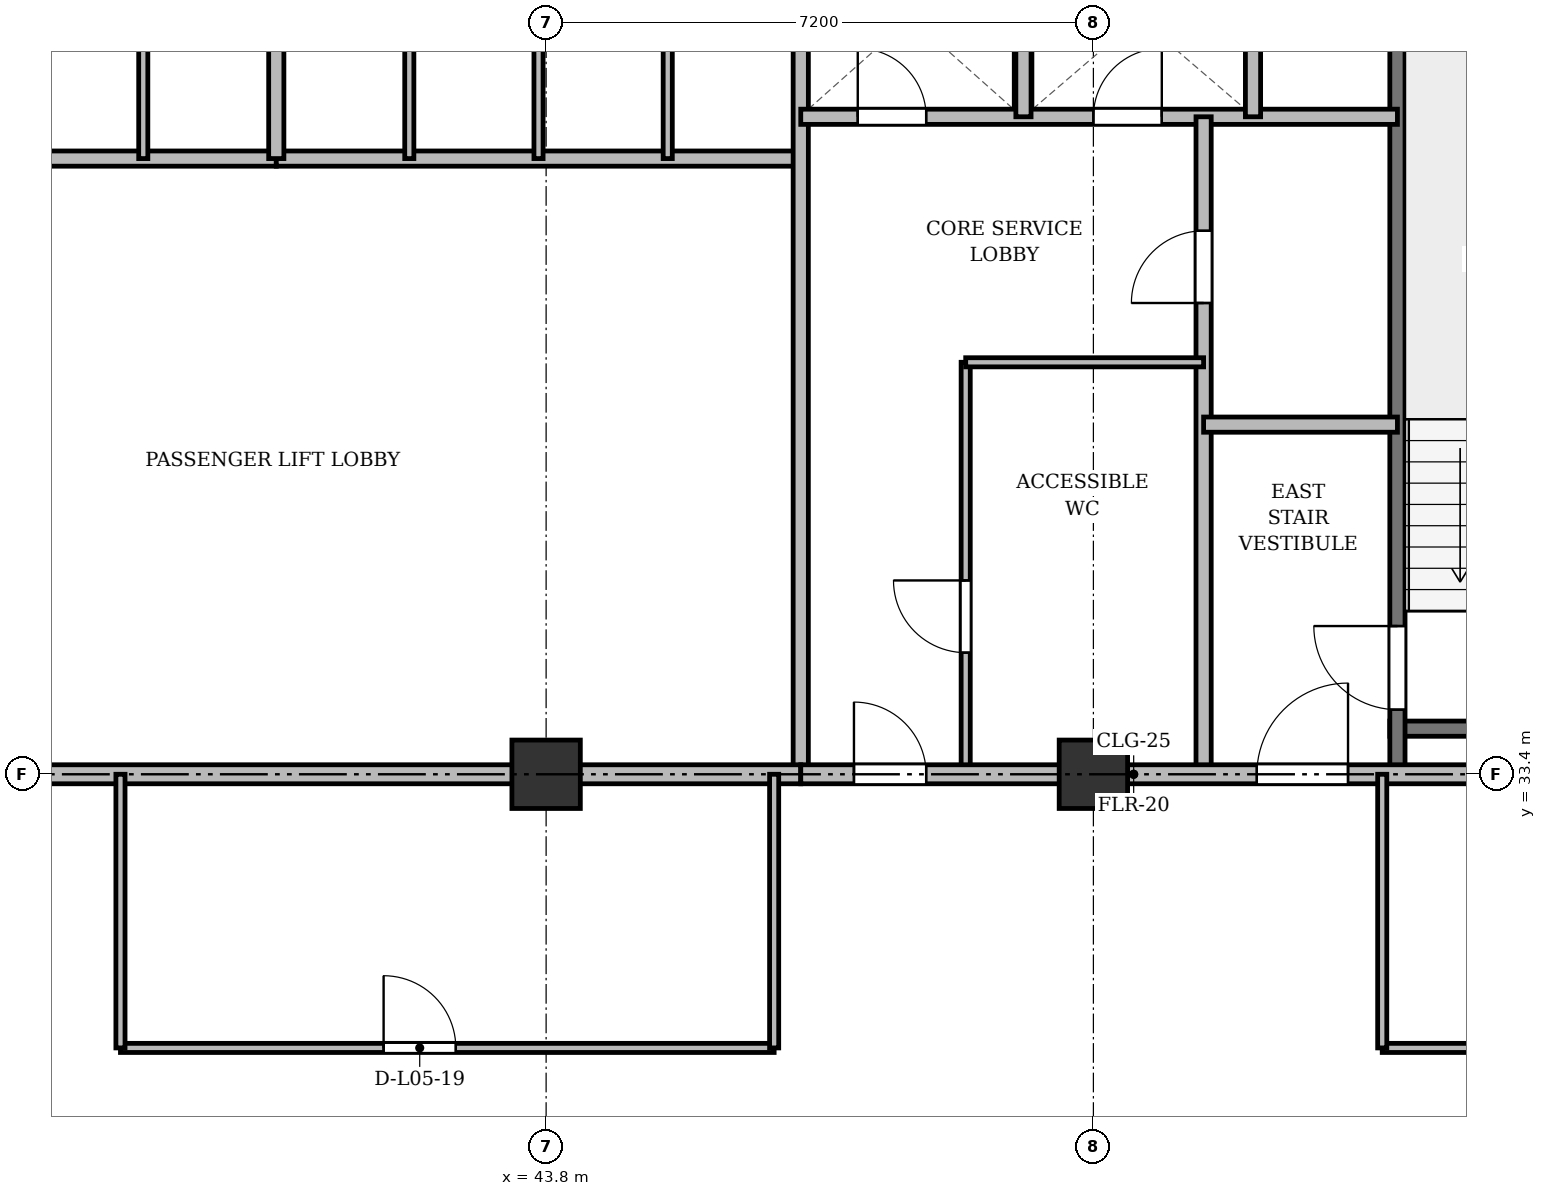
"""IFC4 building model, lengths in metres.
Left out: names, types, materials, properties, quantities, classifications, styles, units other than length and angle.
Written with IfcOpenShell. Run it as: python <this file> out.ifc"""

import sys

from ifc_helpers import new_model, si_unit, direction, frame, frame_2d, origin, origin_2d, place, context, subcontext, project, spatial, rectangle, extrude, source, transform, mapped, element, fill, save


model = new_model("IFC4")
c1 = context("Model", 3, precision=1e-05, world=origin(), true_north=direction((0.0, 1.0)))
c2 = subcontext(c1, "Body", "Model", "MODEL_VIEW")
j1 = project(units=[si_unit("LENGTHUNIT", "METRE"), si_unit("PLANEANGLEUNIT", "RADIAN")], contexts=[c1])
p1 = place(None, origin())
s1 = spatial("IfcSite", under=j1, at=p1, CompositionType="ELEMENT")
p2 = place(p1, origin())
s2 = spatial("IfcBuilding", under=s1, at=p2, CompositionType="ELEMENT")
p3 = place(p2, frame((0.0, 0.0, 23.5)))
s3 = spatial("IfcBuildingStorey", under=s2, at=p3, CompositionType="ELEMENT", Elevation=23.5)
m1 = source(origin(), c2, "Body", "SweptSolid", [
    extrude(rectangle(XDim=0.9, YDim=0.9, at=origin_2d()), origin(), (0.0, 0.0, 1.0), 3.6),
])
for number, where, z_axis, x_axis in (
    (1, (43.8, 33.4, 0.0), (0.0, 0.0, 1.0), (1.0, 0.0, 0.0)),
    (2, (51.0, 33.4, 0.0), (0.0, 0.0, 1.0), (1.0, 0.0, 0.0)),
):
    element("IfcColumn", number, at=place(p3, frame(where, z_axis=z_axis, x_axis=x_axis)), inside=s3, PredefinedType="COLUMN", context=c2, shape_type="MappedRepresentation", body=[
        mapped(m1, transform((0.0, 0.0, 0.0), x_axis=(1.0, 0.0, 0.0), y_axis=(0.0, 1.0, 0.0), z_axis=(0.0, 0.0, 1.0), scale=1.0)),
    ])
p4 = place(p3, frame((54.9, 34.0, 0.0), z_axis=(0.0, 0.0, 1.0), x_axis=(1.0, 0.0, 0.0)))
e3 = element("IfcWall", 3, at=p4, inside=s3, PredefinedType="SHEAR", context=c2, shape_type="SweptSolid", body=[
    extrude(rectangle(XDim=3.4, YDim=0.2, at=frame_2d((1.7, 0.0))), origin(), (0.0, 0.0, 1.0), 3.34),
])
p5 = place(p3, frame((55.0, 33.4, 0.0), z_axis=(0.0, 0.0, 1.0), x_axis=(0.0, 1.0, 0.0)))
e4 = element("IfcWall", 4, at=p5, inside=s3, PredefinedType="SHEAR", context=c2, shape_type="SweptSolid", body=[
    extrude(rectangle(XDim=11.1, YDim=0.2, at=frame_2d((5.55, 0.0))), origin(), (0.0, 0.0, 1.0), 3.34),
])
p6 = place(p5, frame((0.85, 0.0, 0.0)))
e5 = element("IfcOpeningElement", 5, at=p6, cuts=e4, PredefinedType="OPENING", context=c2, shape_type="SweptSolid", body=[
    extrude(rectangle(XDim=1.1, YDim=2.15, at=frame_2d((0.55, 1.075))), frame((0.0, 0.11, 0.0), z_axis=(0.0, -1.0, 0.0), x_axis=(1.0, 0.0, 0.0)), (0.0, 0.0, 1.0), 0.22),
])
p7 = place(p3, frame((33.35, 41.5, 0.0), z_axis=(0.0, 0.0, 1.0), x_axis=(1.0, 0.0, 0.0)))
e6 = element("IfcWall", 6, at=p7, inside=s3, PredefinedType="SOLIDWALL", context=c2, shape_type="SweptSolid", body=[
    extrude(rectangle(XDim=6.9, YDim=0.2, at=frame_2d((3.45, 0.0))), origin(), (0.0, 0.0, 1.0), 3.34),
])
p8 = place(p3, frame((38.5, 41.5, 0.0), z_axis=(0.0, 0.0, 1.0), x_axis=(0.0, 1.0, 0.0)))
e7 = element("IfcWall", 7, at=p8, inside=s3, PredefinedType="PARTITIONING", context=c2, shape_type="SweptSolid", body=[
    extrude(rectangle(XDim=3.2, YDim=0.12, at=frame_2d((1.6, 0.0))), origin(), (0.0, 0.0, 1.0), 3.34),
])
p9 = place(p3, frame((40.25, 41.5, 0.0), z_axis=(0.0, 0.0, 1.0), x_axis=(1.0, 0.0, 0.0)))
e8 = element("IfcWall", 8, at=p9, inside=s3, PredefinedType="SOLIDWALL", context=c2, shape_type="SweptSolid", body=[
    extrude(rectangle(XDim=6.9, YDim=0.2, at=frame_2d((3.45, 0.0))), origin(), (0.0, 0.0, 1.0), 2.752),
])
p10 = place(p3, frame((40.25, 41.5, 0.0), z_axis=(0.0, 0.0, 1.0), x_axis=(0.0, 1.0, 0.0)))
e9 = element("IfcWall", 9, at=p10, inside=s3, PredefinedType="SOLIDWALL", context=c2, shape_type="SweptSolid", body=[
    extrude(rectangle(XDim=3.2, YDim=0.2, at=frame_2d((1.6, 0.0))), origin(), (0.0, 0.0, 1.0), 3.34),
])
p11 = place(p3, frame((42.0, 41.5, 0.0), z_axis=(0.0, 0.0, 1.0), x_axis=(0.0, 1.0, 0.0)))
e10 = element("IfcWall", 10, at=p11, inside=s3, PredefinedType="PARTITIONING", context=c2, shape_type="SweptSolid", body=[
    extrude(rectangle(XDim=3.2, YDim=0.12, at=frame_2d((1.6, 0.0))), origin(), (0.0, 0.0, 1.0), 3.34),
])
p12 = place(p3, frame((43.7, 41.5, 0.0), z_axis=(0.0, 0.0, 1.0), x_axis=(0.0, 1.0, 0.0)))
e11 = element("IfcWall", 11, at=p12, inside=s3, PredefinedType="PARTITIONING", context=c2, shape_type="SweptSolid", body=[
    extrude(rectangle(XDim=3.2, YDim=0.12, at=frame_2d((1.6, 0.0))), origin(), (0.0, 0.0, 1.0), 2.752),
])
p13 = place(p3, frame((45.4, 41.5, 0.0), z_axis=(0.0, 0.0, 1.0), x_axis=(0.0, 1.0, 0.0)))
e12 = element("IfcWall", 12, at=p13, inside=s3, PredefinedType="PARTITIONING", context=c2, shape_type="SweptSolid", body=[
    extrude(rectangle(XDim=3.2, YDim=0.12, at=frame_2d((1.6, 0.0))), origin(), (0.0, 0.0, 1.0), 3.34),
])
p14 = place(p3, frame((47.15, 33.4, 0.0), z_axis=(0.0, 0.0, 1.0), x_axis=(0.0, 1.0, 0.0)))
e13 = element("IfcWall", 13, at=p14, inside=s3, PredefinedType="SOLIDWALL", context=c2, shape_type="SweptSolid", body=[
    extrude(rectangle(XDim=11.3, YDim=0.2, at=frame_2d((5.65, 0.0))), origin(), (0.0, 0.0, 1.0), 2.69),
])
p15 = place(p3, frame((26.3, 33.4, 0.0), z_axis=(0.0, 0.0, 1.0), x_axis=(1.0, 0.0, 0.0)))
e14 = element("IfcWall", 14, at=p15, inside=s3, PredefinedType="PARTITIONING", context=c2, shape_type="SweptSolid", body=[
    extrude(rectangle(XDim=20.85, YDim=0.25, at=frame_2d((10.425, 0.0))), origin(), (0.0, 0.0, 1.0), 2.69),
])
p16 = place(p15, frame((9.2, 0.0, 0.0)))
e15 = element("IfcOpeningElement", 15, at=p16, cuts=e14, PredefinedType="OPENING", context=c2, shape_type="SweptSolid", body=[
    extrude(rectangle(XDim=1.6, YDim=2.2, at=frame_2d((0.8, 1.1))), frame((0.0, 0.135, 0.0), z_axis=(0.0, -1.0, 0.0), x_axis=(1.0, 0.0, 0.0)), (0.0, 0.0, 1.0), 0.27),
])
p17 = place(p3, frame((47.15, 42.05, 0.0), z_axis=(0.0, 0.0, 1.0), x_axis=(1.0, 0.0, 0.0)))
e16 = element("IfcWall", 16, at=p17, inside=s3, PredefinedType="SOLIDWALL", context=c2, shape_type="SweptSolid", body=[
    extrude(rectangle(XDim=7.85, YDim=0.2, at=frame_2d((3.925, 0.0))), origin(), (0.0, 0.0, 1.0), 2.752),
])
p18 = place(p17, frame((0.75, 0.0, 0.0)))
e17 = element("IfcOpeningElement", 17, at=p18, cuts=e16, PredefinedType="OPENING", context=c2, shape_type="SweptSolid", body=[
    extrude(rectangle(XDim=0.9, YDim=2.1, at=frame_2d((0.45, 1.05))), frame((0.0, 0.11, 0.0), z_axis=(0.0, -1.0, 0.0), x_axis=(1.0, 0.0, 0.0)), (0.0, 0.0, 1.0), 0.22),
])
p19 = place(p17, frame((3.85, 0.0, 0.0)))
e18 = element("IfcOpeningElement", 18, at=p19, cuts=e16, PredefinedType="OPENING", context=c2, shape_type="SweptSolid", body=[
    extrude(rectangle(XDim=0.9, YDim=2.1, at=frame_2d((0.45, 1.05))), frame((0.0, 0.11, 0.0), z_axis=(0.0, -1.0, 0.0), x_axis=(1.0, 0.0, 0.0)), (0.0, 0.0, 1.0), 0.22),
])
for number, where, z_axis, x_axis in (
    (19, (50.08, 42.05, 0.0), (0.0, 0.0, 1.0), (0.0, 1.0, 0.0)),
    (20, (53.1, 42.05, 0.0), (0.0, 0.0, 1.0), (0.0, 1.0, 0.0)),
):
    element("IfcWall", number, at=place(p3, frame(where, z_axis=z_axis, x_axis=x_axis)), inside=s3, PredefinedType="SOLIDWALL", context=c2, shape_type="SweptSolid", body=[
        extrude(rectangle(XDim=2.65, YDim=0.2, at=frame_2d((1.325, 0.0))), origin(), (0.0, 0.0, 1.0), 3.34),
    ])
p20 = place(p3, frame((52.45, 33.4, 0.0), z_axis=(0.0, 0.0, 1.0), x_axis=(0.0, 1.0, 0.0)))
e21 = element("IfcWall", 21, at=p20, inside=s3, PredefinedType="PARTITIONING", context=c2, shape_type="SweptSolid", body=[
    extrude(rectangle(XDim=8.65, YDim=0.2, at=frame_2d((4.325, 0.0))), origin(), (0.0, 0.0, 1.0), 2.69),
])
p21 = place(p20, frame((6.2, 0.0, 0.0)))
e22 = element("IfcOpeningElement", 22, at=p21, cuts=e21, PredefinedType="OPENING", context=c2, shape_type="SweptSolid", body=[
    extrude(rectangle(XDim=0.95, YDim=2.15, at=frame_2d((0.475, 1.075))), frame((0.0, 0.11, 0.0), z_axis=(0.0, -1.0, 0.0), x_axis=(1.0, 0.0, 0.0)), (0.0, 0.0, 1.0), 0.22),
])
p22 = place(p3, frame((52.45, 38.0, 0.0), z_axis=(0.0, 0.0, 1.0), x_axis=(1.0, 0.0, 0.0)))
e23 = element("IfcWall", 23, at=p22, inside=s3, PredefinedType="PARTITIONING", context=c2, shape_type="SweptSolid", body=[
    extrude(rectangle(XDim=2.55, YDim=0.2, at=frame_2d((1.275, 0.0))), origin(), (0.0, 0.0, 1.0), 3.34),
])
p23 = place(p3, frame((49.32, 33.4, 0.0), z_axis=(0.0, 0.0, 1.0), x_axis=(0.0, 1.0, 0.0)))
e24 = element("IfcWall", 24, at=p23, inside=s3, PredefinedType="PARTITIONING", context=c2, shape_type="SweptSolid", body=[
    extrude(rectangle(XDim=5.42, YDim=0.12, at=frame_2d((2.71, 0.0))), origin(), (0.0, 0.0, 1.0), 2.69),
])
p24 = place(p23, frame((1.6, 0.0, 0.0)))
e25 = element("IfcOpeningElement", 25, at=p24, cuts=e24, PredefinedType="OPENING", context=c2, shape_type="SweptSolid", body=[
    extrude(rectangle(XDim=0.95, YDim=2.15, at=frame_2d((0.475, 1.075))), frame((0.0, 0.07, 0.0), z_axis=(0.0, -1.0, 0.0), x_axis=(1.0, 0.0, 0.0)), (0.0, 0.0, 1.0), 0.14),
])
p25 = place(p3, frame((49.32, 38.82, 0.0), z_axis=(0.0, 0.0, 1.0), x_axis=(1.0, 0.0, 0.0)))
e26 = element("IfcWall", 26, at=p25, inside=s3, PredefinedType="PARTITIONING", context=c2, shape_type="SweptSolid", body=[
    extrude(rectangle(XDim=3.13, YDim=0.12, at=frame_2d((1.565, 0.0))), origin(), (0.0, 0.0, 1.0), 2.752),
])
p26 = place(p3, frame((47.15, 33.4, 0.0), z_axis=(0.0, 0.0, 1.0), x_axis=(1.0, 0.0, 0.0)))
e27 = element("IfcWall", 27, at=p26, inside=s3, PredefinedType="PARTITIONING", context=c2, shape_type="SweptSolid", body=[
    extrude(rectangle(XDim=11.15, YDim=0.25, at=frame_2d((5.575, 0.0))), origin(), (0.0, 0.0, 1.0), 2.69),
])
p27 = place(p26, frame((0.7, 0.0, 0.0)))
e28 = element("IfcOpeningElement", 28, at=p27, cuts=e27, PredefinedType="OPENING", context=c2, shape_type="SweptSolid", body=[
    extrude(rectangle(XDim=0.95, YDim=2.15, at=frame_2d((0.475, 1.075))), frame((0.0, 0.135, 0.0), z_axis=(0.0, -1.0, 0.0), x_axis=(1.0, 0.0, 0.0)), (0.0, 0.0, 1.0), 0.27),
])
p28 = place(p26, frame((6.0, 0.0, 0.0)))
e29 = element("IfcOpeningElement", 29, at=p28, cuts=e27, PredefinedType="OPENING", context=c2, shape_type="SweptSolid", body=[
    extrude(rectangle(XDim=1.2, YDim=2.15, at=frame_2d((0.6, 1.075))), frame((0.0, 0.135, 0.0), z_axis=(0.0, -1.0, 0.0), x_axis=(1.0, 0.0, 0.0)), (0.0, 0.0, 1.0), 0.27),
])
p29 = place(p3, frame((38.2, 29.8, 0.0), z_axis=(0.0, 0.0, 1.0), x_axis=(1.0, 0.0, 0.0)))
e30 = element("IfcWall", 30, at=p29, inside=s3, PredefinedType="PARTITIONING", context=c2, shape_type="SweptSolid", body=[
    extrude(rectangle(XDim=8.6, YDim=0.12, at=frame_2d((4.3, 0.0))), origin(), (0.0, 0.0, 1.0), 2.752),
])
p30 = place(p29, frame((3.462, 0.0, 0.0)))
e31 = element("IfcOpeningElement", 31, at=p30, cuts=e30, PredefinedType="OPENING", context=c2, shape_type="SweptSolid", body=[
    extrude(rectangle(XDim=0.95, YDim=2.15, at=frame_2d((0.475, 1.075))), frame((0.0, 0.07, 0.0), z_axis=(0.0, -1.0, 0.0), x_axis=(1.0, 0.0, 0.0)), (0.0, 0.0, 1.0), 0.14),
])
p31 = place(p3, frame((54.8, 29.8, 0.0), z_axis=(0.0, 0.0, 1.0), x_axis=(1.0, 0.0, 0.0)))
e32 = element("IfcWall", 32, at=p31, inside=s3, PredefinedType="PARTITIONING", context=c2, shape_type="SweptSolid", body=[
    extrude(rectangle(XDim=14.85, YDim=0.12, at=frame_2d((7.425, 0.0))), origin(), (0.0, 0.0, 1.0), 2.752),
])
p32 = place(p31, frame((2.5, 0.0, 0.0)))
e33 = element("IfcOpeningElement", 33, at=p32, cuts=e32, PredefinedType="OPENING", context=c2, shape_type="SweptSolid", body=[
    extrude(rectangle(XDim=0.95, YDim=2.15, at=frame_2d((0.475, 1.075))), frame((0.0, 0.07, 0.0), z_axis=(0.0, -1.0, 0.0), x_axis=(1.0, 0.0, 0.0)), (0.0, 0.0, 1.0), 0.14),
])
p33 = place(p31, frame((9.2, 0.0, 0.0)))
e34 = element("IfcOpeningElement", 34, at=p33, cuts=e32, PredefinedType="OPENING", context=c2, shape_type="SweptSolid", body=[
    extrude(rectangle(XDim=0.95, YDim=2.15, at=frame_2d((0.475, 1.075))), frame((0.0, 0.07, 0.0), z_axis=(0.0, -1.0, 0.0), x_axis=(1.0, 0.0, 0.0)), (0.0, 0.0, 1.0), 0.14),
])
for number, where, z_axis, x_axis in (
    (35, (38.2, 29.8, 0.0), (0.0, 0.0, 1.0), (0.0, 1.0, 0.0)),
    (36, (46.8, 29.8, 0.0), (0.0, 0.0, 1.0), (0.0, 1.0, 0.0)),
    (37, (54.8, 29.8, 0.0), (0.0, 0.0, 1.0), (0.0, 1.0, 0.0)),
):
    element("IfcWall", number, at=place(p3, frame(where, z_axis=z_axis, x_axis=x_axis)), inside=s3, PredefinedType="PARTITIONING", context=c2, shape_type="SweptSolid", body=[
        extrude(rectangle(XDim=3.6, YDim=0.12, at=frame_2d((1.8, 0.0))), origin(), (0.0, 0.0, 1.0), 2.69),
    ])
m2 = source(origin(), c2, "Body", "SweptSolid", [
    extrude(rectangle(XDim=1.1, YDim=2.15, at=frame_2d((0.55, 1.075))), frame((0.0, 0.025, 0.0), z_axis=(0.0, -1.0, 0.0), x_axis=(1.0, 0.0, 0.0)), (0.0, 0.0, 1.0), 0.05),
])
p34 = place(p6, origin())
e38 = element("IfcDoor", 38, at=p34, inside=s3, OperationType="SINGLE_SWING_RIGHT", PredefinedType="DOOR", context=c2, shape_type="MappedRepresentation", body=[
    mapped(m2, transform((0.0, 0.0, 0.0), x_axis=(1.0, 0.0, 0.0), y_axis=(0.0, 1.0, 0.0), z_axis=(0.0, 0.0, 1.0), scale=1.0)),
])
fill(e5, e38)
m3 = source(origin(), c2, "Body", "SweptSolid", [
    extrude(rectangle(XDim=0.9, YDim=2.1, at=frame_2d((0.45, 1.05))), frame((0.0, 0.025, 0.0), z_axis=(0.0, -1.0, 0.0), x_axis=(1.0, 0.0, 0.0)), (0.0, 0.0, 1.0), 0.05),
])
p35 = place(p18, origin())
e39 = element("IfcDoor", 39, at=p35, inside=s3, OperationType="SINGLE_SWING_LEFT", PredefinedType="DOOR", context=c2, shape_type="MappedRepresentation", body=[
    mapped(m3, transform((0.0, 0.0, 0.0), x_axis=(1.0, 0.0, 0.0), y_axis=(0.0, 1.0, 0.0), z_axis=(0.0, 0.0, 1.0), scale=1.0)),
])
fill(e17, e39)
p36 = place(p19, origin())
e40 = element("IfcDoor", 40, at=p36, inside=s3, OperationType="SINGLE_SWING_RIGHT", PredefinedType="DOOR", context=c2, shape_type="MappedRepresentation", body=[
    mapped(m3, transform((0.0, 0.0, 0.0), x_axis=(1.0, 0.0, 0.0), y_axis=(0.0, 1.0, 0.0), z_axis=(0.0, 0.0, 1.0), scale=1.0)),
])
fill(e18, e40)
m4 = source(origin(), c2, "Body", "SweptSolid", [
    extrude(rectangle(XDim=0.95, YDim=2.15, at=frame_2d((0.475, 1.075))), frame((0.0, 0.025, 0.0), z_axis=(0.0, -1.0, 0.0), x_axis=(1.0, 0.0, 0.0)), (0.0, 0.0, 1.0), 0.05),
])
p37 = place(p21, origin())
e41 = element("IfcDoor", 41, at=p37, inside=s3, OperationType="SINGLE_SWING_LEFT", PredefinedType="DOOR", context=c2, shape_type="MappedRepresentation", body=[
    mapped(m4, transform((0.0, 0.0, 0.0), x_axis=(1.0, 0.0, 0.0), y_axis=(0.0, 1.0, 0.0), z_axis=(0.0, 0.0, 1.0), scale=1.0)),
])
fill(e22, e41)
p38 = place(p24, origin())
e42 = element("IfcDoor", 42, at=p38, inside=s3, OperationType="SINGLE_SWING_RIGHT", PredefinedType="DOOR", context=c2, shape_type="MappedRepresentation", body=[
    mapped(m4, transform((0.0, 0.0, 0.0), x_axis=(1.0, 0.0, 0.0), y_axis=(0.0, 1.0, 0.0), z_axis=(0.0, 0.0, 1.0), scale=1.0)),
])
fill(e25, e42)
p39 = place(p27, origin())
e43 = element("IfcDoor", 43, at=p39, inside=s3, OperationType="SINGLE_SWING_LEFT", PredefinedType="DOOR", context=c2, shape_type="MappedRepresentation", body=[
    mapped(m4, transform((0.0, 0.0, 0.0), x_axis=(1.0, 0.0, 0.0), y_axis=(0.0, 1.0, 0.0), z_axis=(0.0, 0.0, 1.0), scale=1.0)),
])
fill(e28, e43)
m5 = source(origin(), c2, "Body", "SweptSolid", [
    extrude(rectangle(XDim=1.2, YDim=2.15, at=frame_2d((0.6, 1.075))), frame((0.0, 0.025, 0.0), z_axis=(0.0, -1.0, 0.0), x_axis=(1.0, 0.0, 0.0)), (0.0, 0.0, 1.0), 0.05),
])
p40 = place(p28, origin())
e44 = element("IfcDoor", 44, at=p40, inside=s3, OperationType="SINGLE_SWING_RIGHT", PredefinedType="DOOR", context=c2, shape_type="MappedRepresentation", body=[
    mapped(m5, transform((0.0, 0.0, 0.0), x_axis=(1.0, 0.0, 0.0), y_axis=(0.0, 1.0, 0.0), z_axis=(0.0, 0.0, 1.0), scale=1.0)),
])
fill(e29, e44)
p41 = place(p30, origin())
e45 = element("IfcDoor", 45, at=p41, inside=s3, OperationType="SINGLE_SWING_LEFT", PredefinedType="DOOR", context=c2, shape_type="MappedRepresentation", body=[
    mapped(m4, transform((0.0, 0.0, 0.0), x_axis=(1.0, 0.0, 0.0), y_axis=(0.0, 1.0, 0.0), z_axis=(0.0, 0.0, 1.0), scale=1.0)),
])
fill(e31, e45)
save(model, sys.argv[1])
